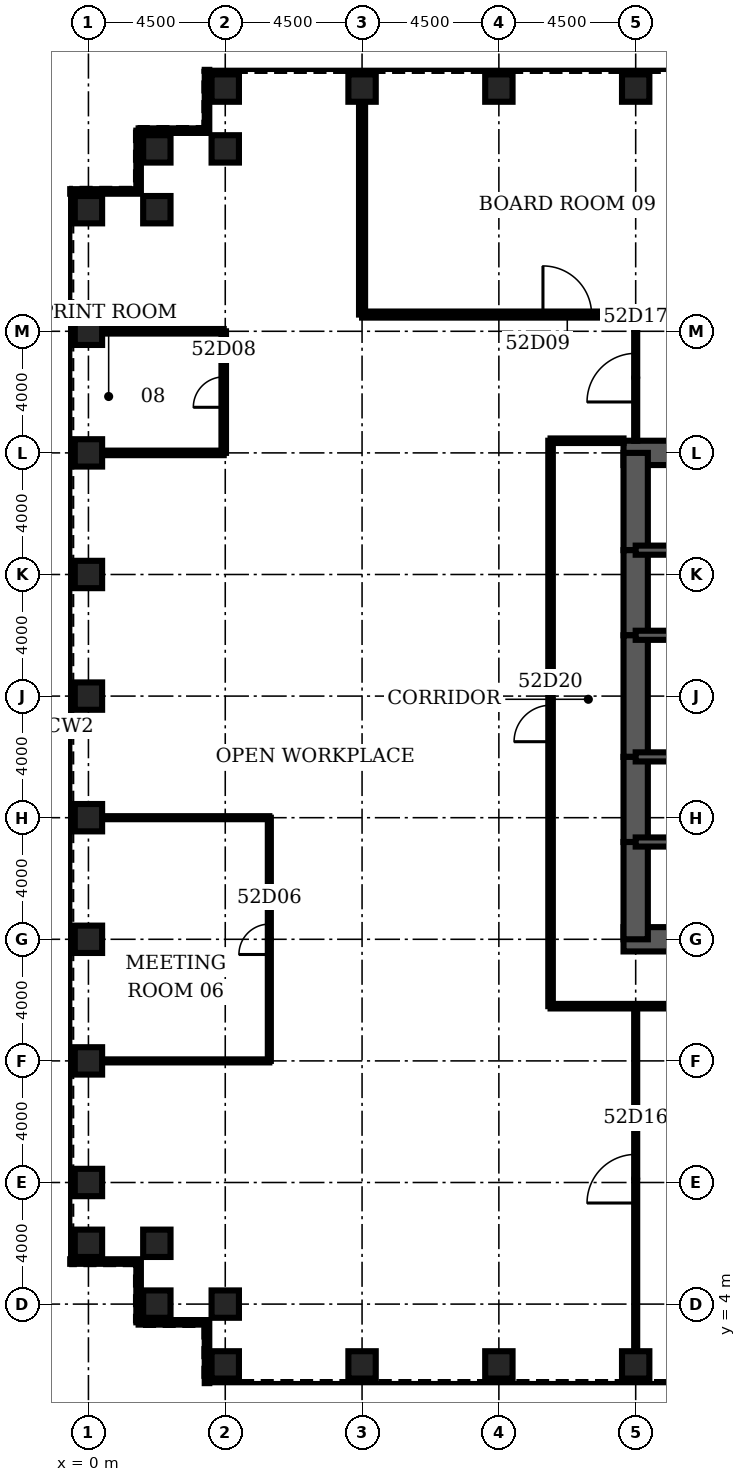
"""IFC4 building model, lengths in metres.
Left out: names, types, materials, properties, quantities, classifications, styles, units other than length and angle.
Written with IfcOpenShell. Run it as: python <this file> out.ifc"""

import sys

from ifc_helpers import new_model, si_unit, direction, frame, frame_2d, origin, origin_2d, place, context, subcontext, project, spatial, rectangle, hollow_rectangle, extrude, element, fill, save


model = new_model("IFC4")
c1 = context("Model", 3, precision=1e-05, world=origin(), true_north=direction((0.0, 1.0)))
c2 = subcontext(c1, "Body", "Model", "MODEL_VIEW")
j1 = project(units=[si_unit("LENGTHUNIT", "METRE"), si_unit("PLANEANGLEUNIT", "RADIAN")], contexts=[c1])
p1 = place(None, origin())
s1 = spatial("IfcSite", under=j1, at=p1, CompositionType="ELEMENT")
p2 = place(p1, origin())
s2 = spatial("IfcBuilding", under=s1, at=p2, CompositionType="ELEMENT")
p3 = place(p2, frame((0.0, 0.0, 232.0)))
s3 = spatial("IfcBuildingStorey", under=s2, at=p3, CompositionType="ELEMENT", Elevation=232.0)
for number, where, z_axis, x_axis in (
    (1, (4.5, 2.0, 0.0), (0.0, 0.0, 1.0), (0.0, 1.0, 0.0)),
    (2, (9.0, 2.0, 0.0), (0.0, 0.0, 1.0), (0.0, 1.0, 0.0)),
    (3, (13.5, 2.0, 0.0), (0.0, 0.0, 1.0), (0.0, 1.0, 0.0)),
    (4, (18.0, 2.0, 0.0), (0.0, 0.0, 1.0), (0.0, 1.0, 0.0)),
    (5, (18.0, 44.0, 0.0), (0.0, 0.0, 1.0), (0.0, 1.0, 0.0)),
    (6, (13.5, 44.0, 0.0), (0.0, 0.0, 1.0), (0.0, 1.0, 0.0)),
    (7, (9.0, 44.0, 0.0), (0.0, 0.0, 1.0), (0.0, 1.0, 0.0)),
    (8, (4.5, 44.0, 0.0), (0.0, 0.0, 1.0), (0.0, 1.0, 0.0)),
    (9, (4.5, 42.0, 0.0), (0.0, 0.0, 1.0), (0.0, 1.0, 0.0)),
    (10, (2.25, 42.0, 0.0), (0.0, 0.0, 1.0), (1.0, 0.0, 0.0)),
    (11, (2.25, 40.0, 0.0), (0.0, 0.0, 1.0), (1.0, 0.0, 0.0)),
    (12, (0.0, 40.0, 0.0), (0.0, 0.0, 1.0), (1.0, 0.0, 0.0)),
    (13, (0.0, 36.0, 0.0), (0.0, 0.0, 1.0), (1.0, 0.0, 0.0)),
    (14, (0.0, 32.0, 0.0), (0.0, 0.0, 1.0), (1.0, 0.0, 0.0)),
    (15, (0.0, 28.0, 0.0), (0.0, 0.0, 1.0), (1.0, 0.0, 0.0)),
    (16, (0.0, 24.0, 0.0), (0.0, 0.0, 1.0), (1.0, 0.0, 0.0)),
    (17, (0.0, 20.0, 0.0), (0.0, 0.0, 1.0), (1.0, 0.0, 0.0)),
    (18, (0.0, 16.0, 0.0), (0.0, 0.0, 1.0), (1.0, 0.0, 0.0)),
    (19, (0.0, 12.0, 0.0), (0.0, 0.0, 1.0), (1.0, 0.0, 0.0)),
    (20, (0.0, 8.0, 0.0), (0.0, 0.0, 1.0), (1.0, 0.0, 0.0)),
    (21, (0.0, 6.0, 0.0), (0.0, 0.0, 1.0), (1.0, 0.0, 0.0)),
    (22, (2.25, 6.0, 0.0), (0.0, 0.0, 1.0), (1.0, 0.0, 0.0)),
    (23, (2.25, 4.0, 0.0), (0.0, 0.0, 1.0), (1.0, 0.0, 0.0)),
    (24, (4.5, 4.0, 0.0), (0.0, 0.0, 1.0), (0.0, 1.0, 0.0)),
):
    element("IfcColumn", number, at=place(p3, frame(where, z_axis=z_axis, x_axis=x_axis)), inside=s3, PredefinedType="COLUMN", context=c2, shape_type="SweptSolid", body=[
        extrude(hollow_rectangle(XDim=0.9, YDim=0.9, WallThickness=0.08, at=origin_2d()), origin(), (0.0, 0.0, 1.0), 4.2),
    ])
for number, where, z_axis, x_axis in (
    (25, (17.6, 16.0, 0.0), (0.0, 0.0, 1.0), (1.0, 0.0, 0.0)),
    (26, (27.0, 32.0, 0.0), (0.0, 0.0, 1.0), (-1.0, 0.0, 0.0)),
):
    element("IfcWall", number, at=place(p3, frame(where, z_axis=z_axis, x_axis=x_axis)), inside=s3, PredefinedType="SHEAR", context=c2, shape_type="SweptSolid", body=[
        extrude(rectangle(XDim=9.4, YDim=0.8, at=frame_2d((4.7, 0.0))), origin(), (0.0, 0.0, 1.0), 4.2),
    ])
p4 = place(p3, frame((18.0, 32.0, 0.0), z_axis=(0.0, 0.0, 1.0), x_axis=(0.0, -1.0, 0.0)))
e27 = element("IfcWall", 27, at=p4, inside=s3, PredefinedType="SHEAR", context=c2, shape_type="SweptSolid", body=[
    extrude(rectangle(XDim=3.2, YDim=0.8, at=frame_2d((1.6, 0.0))), origin(), (0.0, 0.0, 1.0), 4.2),
])
p5 = place(p3, frame((18.0, 28.8, 0.0), z_axis=(0.0, 0.0, 1.0), x_axis=(0.0, -1.0, 0.0)))
e28 = element("IfcWall", 28, at=p5, inside=s3, PredefinedType="SHEAR", context=c2, shape_type="SweptSolid", body=[
    extrude(rectangle(XDim=2.8, YDim=0.8, at=frame_2d((1.4, 0.0))), origin(), (0.0, 0.0, 1.0), 4.2),
])
p6 = place(p5, frame((0.4, 0.0, 0.0)))
e29 = element("IfcOpeningElement", 29, at=p6, cuts=e28, PredefinedType="OPENING", context=c2, shape_type="SweptSolid", body=[
    extrude(rectangle(XDim=1.8, YDim=2.1, at=frame_2d((0.9, 1.05))), frame((0.0, 0.41, 0.0), z_axis=(0.0, -1.0, 0.0), x_axis=(1.0, 0.0, 0.0)), (0.0, 0.0, 1.0), 0.82),
])
p7 = place(p3, frame((18.0, 26.0, 0.0), z_axis=(0.0, 0.0, 1.0), x_axis=(0.0, -1.0, 0.0)))
e30 = element("IfcWall", 30, at=p7, inside=s3, PredefinedType="SHEAR", context=c2, shape_type="SweptSolid", body=[
    extrude(rectangle(XDim=4.0, YDim=0.8, at=frame_2d((2.0, 0.0))), origin(), (0.0, 0.0, 1.0), 4.2),
])
p8 = place(p3, frame((18.0, 22.0, 0.0), z_axis=(0.0, 0.0, 1.0), x_axis=(0.0, -1.0, 0.0)))
e31 = element("IfcWall", 31, at=p8, inside=s3, PredefinedType="SHEAR", context=c2, shape_type="SweptSolid", body=[
    extrude(rectangle(XDim=2.8, YDim=0.8, at=frame_2d((1.4, 0.0))), origin(), (0.0, 0.0, 1.0), 4.2),
])
p9 = place(p8, frame((0.6, 0.0, 0.0)))
e32 = element("IfcOpeningElement", 32, at=p9, cuts=e31, PredefinedType="OPENING", context=c2, shape_type="SweptSolid", body=[
    extrude(rectangle(XDim=1.8, YDim=2.1, at=frame_2d((0.9, 1.05))), frame((0.0, 0.41, 0.0), z_axis=(0.0, -1.0, 0.0), x_axis=(1.0, 0.0, 0.0)), (0.0, 0.0, 1.0), 0.82),
])
p10 = place(p3, frame((18.0, 19.2, 0.0), z_axis=(0.0, 0.0, 1.0), x_axis=(0.0, -1.0, 0.0)))
e33 = element("IfcWall", 33, at=p10, inside=s3, PredefinedType="SHEAR", context=c2, shape_type="SweptSolid", body=[
    extrude(rectangle(XDim=3.2, YDim=0.8, at=frame_2d((1.6, 0.0))), origin(), (0.0, 0.0, 1.0), 4.2),
])
p11 = place(p3, frame((18.0, 19.2, 0.0), z_axis=(0.0, 0.0, 1.0), x_axis=(1.0, 0.0, 0.0)))
e34 = element("IfcWall", 34, at=p11, inside=s3, PredefinedType="SOLIDWALL", context=c2, shape_type="SweptSolid", body=[
    extrude(rectangle(XDim=9.0, YDim=0.3, at=frame_2d((4.5, 0.0))), origin(), (0.0, 0.0, 1.0), 4.2),
])
p12 = place(p11, frame((0.65, 0.0, 0.0)))
e35 = element("IfcOpeningElement", 35, at=p12, cuts=e34, PredefinedType="OPENING", context=c2, shape_type="SweptSolid", body=[
    extrude(rectangle(XDim=1.0, YDim=2.1, at=frame_2d((0.5, 1.05))), frame((0.0, 0.16, 0.0), z_axis=(0.0, -1.0, 0.0), x_axis=(1.0, 0.0, 0.0)), (0.0, 0.0, 1.0), 0.32),
])
p13 = place(p3, frame((18.0, 28.8, 0.0), z_axis=(0.0, 0.0, 1.0), x_axis=(1.0, 0.0, 0.0)))
e36 = element("IfcWall", 36, at=p13, inside=s3, PredefinedType="SOLIDWALL", context=c2, shape_type="SweptSolid", body=[
    extrude(rectangle(XDim=9.0, YDim=0.3, at=frame_2d((4.5, 0.0))), origin(), (0.0, 0.0, 1.0), 4.2),
])
p14 = place(p13, frame((0.65, 0.0, 0.0)))
e37 = element("IfcOpeningElement", 37, at=p14, cuts=e36, PredefinedType="OPENING", context=c2, shape_type="SweptSolid", body=[
    extrude(rectangle(XDim=1.0, YDim=2.1, at=frame_2d((0.5, 1.05))), frame((0.0, 0.16, 0.0), z_axis=(0.0, -1.0, 0.0), x_axis=(1.0, 0.0, 0.0)), (0.0, 0.0, 1.0), 0.32),
])
p15 = place(p3, frame((18.0, 22.0, 0.0), z_axis=(0.0, 0.0, 1.0), x_axis=(1.0, 0.0, 0.0)))
e38 = element("IfcWall", 38, at=p15, inside=s3, PredefinedType="SOLIDWALL", context=c2, shape_type="SweptSolid", body=[
    extrude(rectangle(XDim=6.0, YDim=0.3, at=frame_2d((3.0, 0.0))), origin(), (0.0, 0.0, 1.0), 4.2),
])
p16 = place(p15, frame((4.4, 0.0, 0.0)))
e39 = element("IfcOpeningElement", 39, at=p16, cuts=e38, PredefinedType="OPENING", context=c2, shape_type="SweptSolid", body=[
    extrude(rectangle(XDim=1.0, YDim=2.1, at=frame_2d((0.5, 1.05))), frame((0.0, 0.16, 0.0), z_axis=(0.0, -1.0, 0.0), x_axis=(1.0, 0.0, 0.0)), (0.0, 0.0, 1.0), 0.32),
])
p17 = place(p15, frame((0.8, 0.0, 0.0)))
e40 = element("IfcOpeningElement", 40, at=p17, cuts=e38, PredefinedType="OPENING", context=c2, shape_type="SweptSolid", body=[
    extrude(rectangle(XDim=1.0, YDim=2.1, at=frame_2d((0.5, 1.05))), frame((0.0, 0.16, 0.0), z_axis=(0.0, -1.0, 0.0), x_axis=(1.0, 0.0, 0.0)), (0.0, 0.0, 1.0), 0.32),
])
p18 = place(p3, frame((18.0, 26.0, 0.0), z_axis=(0.0, 0.0, 1.0), x_axis=(1.0, 0.0, 0.0)))
e41 = element("IfcWall", 41, at=p18, inside=s3, PredefinedType="SOLIDWALL", context=c2, shape_type="SweptSolid", body=[
    extrude(rectangle(XDim=6.0, YDim=0.3, at=frame_2d((3.0, 0.0))), origin(), (0.0, 0.0, 1.0), 4.2),
])
p19 = place(p3, frame((0.45, 12.0, 0.0), z_axis=(0.0, 0.0, 1.0), x_axis=(1.0, 0.0, 0.0)))
e42 = element("IfcWall", 42, at=p19, inside=s3, PredefinedType="PARTITIONING", context=c2, shape_type="SweptSolid", body=[
    extrude(rectangle(XDim=5.5, YDim=0.1, at=frame_2d((2.75, 0.0))), origin(), (0.0, 0.0, 1.0), 3.0),
])
p20 = place(p3, frame((15.2, 13.8, 0.0), z_axis=(0.0, 0.0, 1.0), x_axis=(1.0, 0.0, 0.0)))
e43 = element("IfcWall", 43, at=p20, inside=s3, PredefinedType="PARTITIONING", context=c2, shape_type="SweptSolid", body=[
    extrude(rectangle(XDim=6.8, YDim=0.15, at=frame_2d((3.4, 0.0))), origin(), (0.0, 0.0, 1.0), 3.0),
])
p21 = place(p3, frame((0.45, 20.0, 0.0), z_axis=(0.0, 0.0, 1.0), x_axis=(1.0, 0.0, 0.0)))
e44 = element("IfcWall", 44, at=p21, inside=s3, PredefinedType="PARTITIONING", context=c2, shape_type="SweptSolid", body=[
    extrude(rectangle(XDim=5.5, YDim=0.1, at=frame_2d((2.75, 0.0))), origin(), (0.0, 0.0, 1.0), 3.0),
])
p22 = place(p3, frame((0.45, 32.0, 0.0), z_axis=(0.0, 0.0, 1.0), x_axis=(1.0, 0.0, 0.0)))
e45 = element("IfcWall", 45, at=p22, inside=s3, PredefinedType="PARTITIONING", context=c2, shape_type="SweptSolid", body=[
    extrude(rectangle(XDim=4.0, YDim=0.15, at=frame_2d((2.0, 0.0))), origin(), (0.0, 0.0, 1.0), 3.0),
])
p23 = place(p3, frame((15.2, 32.4, 0.0), z_axis=(0.0, 0.0, 1.0), x_axis=(1.0, 0.0, 0.0)))
e46 = element("IfcWall", 46, at=p23, inside=s3, PredefinedType="PARTITIONING", context=c2, shape_type="SweptSolid", body=[
    extrude(rectangle(XDim=2.4, YDim=0.15, at=frame_2d((1.2, 0.0))), origin(), (0.0, 0.0, 1.0), 3.0),
])
p24 = place(p3, frame((0.45, 36.0, 0.0), z_axis=(0.0, 0.0, 1.0), x_axis=(1.0, 0.0, 0.0)))
e47 = element("IfcWall", 47, at=p24, inside=s3, PredefinedType="PARTITIONING", context=c2, shape_type="SweptSolid", body=[
    extrude(rectangle(XDim=4.0, YDim=0.15, at=frame_2d((2.0, 0.0))), origin(), (0.0, 0.0, 1.0), 3.0),
])
p25 = place(p3, frame((9.0, 36.55, 0.0), z_axis=(0.0, 0.0, 1.0), x_axis=(1.0, 0.0, 0.0)))
e48 = element("IfcWall", 48, at=p25, inside=s3, PredefinedType="PARTITIONING", context=c2, shape_type="SweptSolid", body=[
    extrude(rectangle(XDim=13.5, YDim=0.2, at=frame_2d((6.75, 0.0))), origin(), (0.0, 0.0, 1.0), 3.0),
])
p26 = place(p25, frame((5.95, 0.0, 0.0)))
e49 = element("IfcOpeningElement", 49, at=p26, cuts=e48, PredefinedType="OPENING", context=c2, shape_type="SweptSolid", body=[
    extrude(rectangle(XDim=1.6, YDim=2.1, at=frame_2d((0.8, 1.05))), frame((0.0, 0.11, 0.0), z_axis=(0.0, -1.0, 0.0), x_axis=(1.0, 0.0, 0.0)), (0.0, 0.0, 1.0), 0.22),
])
p27 = place(p3, frame((4.45, 32.0, 0.0), z_axis=(0.0, 0.0, 1.0), x_axis=(0.0, 1.0, 0.0)))
e50 = element("IfcWall", 50, at=p27, inside=s3, PredefinedType="PARTITIONING", context=c2, shape_type="SweptSolid", body=[
    extrude(rectangle(XDim=4.0, YDim=0.15, at=frame_2d((2.0, 0.0))), origin(), (0.0, 0.0, 1.0), 3.0),
])
p28 = place(p27, frame((1.5, 0.0, 0.0)))
e51 = element("IfcOpeningElement", 51, at=p28, cuts=e50, PredefinedType="OPENING", context=c2, shape_type="SweptSolid", body=[
    extrude(rectangle(XDim=1.0, YDim=2.1, at=frame_2d((0.5, 1.05))), frame((0.0, 0.085, 0.0), z_axis=(0.0, -1.0, 0.0), x_axis=(1.0, 0.0, 0.0)), (0.0, 0.0, 1.0), 0.17),
])
p29 = place(p3, frame((5.95, 12.0, 0.0), z_axis=(0.0, 0.0, 1.0), x_axis=(0.0, 1.0, 0.0)))
e52 = element("IfcWall", 52, at=p29, inside=s3, PredefinedType="PARTITIONING", context=c2, shape_type="SweptSolid", body=[
    extrude(rectangle(XDim=8.0, YDim=0.1, at=frame_2d((4.0, 0.0))), origin(), (0.0, 0.0, 1.0), 3.0),
])
p30 = place(p29, frame((3.5, 0.0, 0.0)))
e53 = element("IfcOpeningElement", 53, at=p30, cuts=e52, PredefinedType="OPENING", context=c2, shape_type="SweptSolid", body=[
    extrude(rectangle(XDim=1.0, YDim=2.1, at=frame_2d((0.5, 1.05))), frame((0.0, 0.06, 0.0), z_axis=(0.0, -1.0, 0.0), x_axis=(1.0, 0.0, 0.0)), (0.0, 0.0, 1.0), 0.12),
])
p31 = place(p3, frame((9.0, 36.55, 0.0), z_axis=(0.0, 0.0, 1.0), x_axis=(0.0, 1.0, 0.0)))
e54 = element("IfcWall", 54, at=p31, inside=s3, PredefinedType="PARTITIONING", context=c2, shape_type="SweptSolid", body=[
    extrude(rectangle(XDim=7.0, YDim=0.2, at=frame_2d((3.5, 0.0))), origin(), (0.0, 0.0, 1.0), 3.0),
])
p32 = place(p3, frame((15.2, 13.8, 0.0), z_axis=(0.0, 0.0, 1.0), x_axis=(0.0, 1.0, 0.0)))
e55 = element("IfcWall", 55, at=p32, inside=s3, PredefinedType="PARTITIONING", context=c2, shape_type="SweptSolid", body=[
    extrude(rectangle(XDim=18.6, YDim=0.15, at=frame_2d((9.3, 0.0))), origin(), (0.0, 0.0, 1.0), 3.0),
])
p33 = place(p32, frame((8.7, 0.0, 0.0)))
e56 = element("IfcOpeningElement", 56, at=p33, cuts=e55, PredefinedType="OPENING", context=c2, shape_type="SweptSolid", body=[
    extrude(rectangle(XDim=1.2, YDim=2.1, at=frame_2d((0.6, 1.05))), frame((0.0, 0.085, 0.0), z_axis=(0.0, -1.0, 0.0), x_axis=(1.0, 0.0, 0.0)), (0.0, 0.0, 1.0), 0.17),
])
p34 = place(p3, frame((18.0, 2.45, 0.0), z_axis=(0.0, 0.0, 1.0), x_axis=(0.0, 1.0, 0.0)))
e57 = element("IfcWall", 57, at=p34, inside=s3, PredefinedType="PARTITIONING", context=c2, shape_type="SweptSolid", body=[
    extrude(rectangle(XDim=11.35, YDim=0.1, at=frame_2d((5.675, 0.0))), origin(), (0.0, 0.0, 1.0), 3.0),
])
p35 = place(p34, frame((4.875, 0.0, 0.0)))
e58 = element("IfcOpeningElement", 58, at=p35, cuts=e57, PredefinedType="OPENING", context=c2, shape_type="SweptSolid", body=[
    extrude(rectangle(XDim=1.6, YDim=2.1, at=frame_2d((0.8, 1.05))), frame((0.0, 0.06, 0.0), z_axis=(0.0, -1.0, 0.0), x_axis=(1.0, 0.0, 0.0)), (0.0, 0.0, 1.0), 0.12),
])
p36 = place(p3, frame((18.0, 32.4, 0.0), z_axis=(0.0, 0.0, 1.0), x_axis=(0.0, 1.0, 0.0)))
e59 = element("IfcWall", 59, at=p36, inside=s3, PredefinedType="PARTITIONING", context=c2, shape_type="SweptSolid", body=[
    extrude(rectangle(XDim=4.15, YDim=0.1, at=frame_2d((2.075, 0.0))), origin(), (0.0, 0.0, 1.0), 3.0),
])
p37 = place(p36, frame((1.275, 0.0, 0.0)))
e60 = element("IfcOpeningElement", 60, at=p37, cuts=e59, PredefinedType="OPENING", context=c2, shape_type="SweptSolid", body=[
    extrude(rectangle(XDim=1.6, YDim=2.1, at=frame_2d((0.8, 1.05))), frame((0.0, 0.06, 0.0), z_axis=(0.0, -1.0, 0.0), x_axis=(1.0, 0.0, 0.0)), (0.0, 0.0, 1.0), 0.12),
])
p38 = place(p3, frame((3.9, 44.6, 0.0), z_axis=(0.0, 0.0, 1.0), x_axis=(0.0, -1.0, 0.0)))
e61 = element("IfcWall", 61, at=p38, inside=s3, PredefinedType="ELEMENTEDWALL", context=c2, shape_type="SweptSolid", body=[
    extrude(rectangle(XDim=2.0, YDim=0.15, at=frame_2d((1.0, 0.0))), origin(), (0.0, 0.0, 1.0), 4.04),
])
p39 = place(p3, frame((3.9, 42.6, 0.0), z_axis=(0.0, 0.0, 1.0), x_axis=(-1.0, 0.0, 0.0)))
e62 = element("IfcWall", 62, at=p39, inside=s3, PredefinedType="ELEMENTEDWALL", context=c2, shape_type="SweptSolid", body=[
    extrude(rectangle(XDim=2.25, YDim=0.15, at=frame_2d((1.125, 0.0))), origin(), (0.0, 0.0, 1.0), 4.04),
])
p40 = place(p3, frame((1.65, 42.6, 0.0), z_axis=(0.0, 0.0, 1.0), x_axis=(0.0, -1.0, 0.0)))
e63 = element("IfcWall", 63, at=p40, inside=s3, PredefinedType="ELEMENTEDWALL", context=c2, shape_type="SweptSolid", body=[
    extrude(rectangle(XDim=2.0, YDim=0.15, at=frame_2d((1.0, 0.0))), origin(), (0.0, 0.0, 1.0), 4.04),
])
for number, where, z_axis, x_axis in (
    (64, (1.65, 40.6, 0.0), (0.0, 0.0, 1.0), (-1.0, 0.0, 0.0)),
    (65, (-0.6, 5.4, 0.0), (0.0, 0.0, 1.0), (1.0, 0.0, 0.0)),
):
    element("IfcWall", number, at=place(p3, frame(where, z_axis=z_axis, x_axis=x_axis)), inside=s3, PredefinedType="ELEMENTEDWALL", context=c2, shape_type="SweptSolid", body=[
        extrude(rectangle(XDim=2.25, YDim=0.15, at=frame_2d((1.125, 0.0))), origin(), (0.0, 0.0, 1.0), 4.04),
    ])
p41 = place(p3, frame((1.65, 5.4, 0.0), z_axis=(0.0, 0.0, 1.0), x_axis=(0.0, -1.0, 0.0)))
e66 = element("IfcWall", 66, at=p41, inside=s3, PredefinedType="ELEMENTEDWALL", context=c2, shape_type="SweptSolid", body=[
    extrude(rectangle(XDim=2.0, YDim=0.15, at=frame_2d((1.0, 0.0))), origin(), (0.0, 0.0, 1.0), 4.04),
])
p42 = place(p3, frame((1.65, 3.4, 0.0), z_axis=(0.0, 0.0, 1.0), x_axis=(1.0, 0.0, 0.0)))
e67 = element("IfcWall", 67, at=p42, inside=s3, PredefinedType="ELEMENTEDWALL", context=c2, shape_type="SweptSolid", body=[
    extrude(rectangle(XDim=2.25, YDim=0.15, at=frame_2d((1.125, 0.0))), origin(), (0.0, 0.0, 1.0), 4.04),
])
p43 = place(p3, frame((3.9, 3.4, 0.0), z_axis=(0.0, 0.0, 1.0), x_axis=(0.0, -1.0, 0.0)))
e68 = element("IfcWall", 68, at=p43, inside=s3, PredefinedType="ELEMENTEDWALL", context=c2, shape_type="SweptSolid", body=[
    extrude(rectangle(XDim=2.0, YDim=0.15, at=frame_2d((1.0, 0.0))), origin(), (0.0, 0.0, 1.0), 4.04),
])
p44 = place(p30, origin())
e69 = element("IfcDoor", 69, at=p44, inside=s3, OperationType="SINGLE_SWING_LEFT", PredefinedType="DOOR", context=c2, shape_type="SweptSolid", body=[
    extrude(rectangle(XDim=1.0, YDim=2.1, at=frame_2d((0.5, 1.05))), frame((0.0, 0.025, 0.0), z_axis=(0.0, -1.0, 0.0), x_axis=(1.0, 0.0, 0.0)), (0.0, 0.0, 1.0), 0.05),
])
fill(e53, e69)
p45 = place(p28, origin())
e70 = element("IfcDoor", 70, at=p45, inside=s3, OperationType="SINGLE_SWING_LEFT", PredefinedType="DOOR", context=c2, shape_type="SweptSolid", body=[
    extrude(rectangle(XDim=1.0, YDim=2.1, at=frame_2d((0.5, 1.05))), frame((0.0, 0.025, 0.0), z_axis=(0.0, -1.0, 0.0), x_axis=(1.0, 0.0, 0.0)), (0.0, 0.0, 1.0), 0.05),
])
fill(e51, e70)
p46 = place(p26, origin())
e71 = element("IfcDoor", 71, at=p46, inside=s3, OperationType="SINGLE_SWING_LEFT", PredefinedType="DOOR", context=c2, shape_type="SweptSolid", body=[
    extrude(rectangle(XDim=1.6, YDim=2.1, at=frame_2d((0.8, 1.05))), frame((0.0, 0.025, 0.0), z_axis=(0.0, -1.0, 0.0), x_axis=(1.0, 0.0, 0.0)), (0.0, 0.0, 1.0), 0.05),
])
fill(e49, e71)
p47 = place(p35, origin())
e72 = element("IfcDoor", 72, at=p47, inside=s3, OperationType="SINGLE_SWING_LEFT", PredefinedType="DOOR", context=c2, shape_type="SweptSolid", body=[
    extrude(rectangle(XDim=1.6, YDim=2.1, at=frame_2d((0.8, 1.05))), frame((0.0, 0.025, 0.0), z_axis=(0.0, -1.0, 0.0), x_axis=(1.0, 0.0, 0.0)), (0.0, 0.0, 1.0), 0.05),
])
fill(e58, e72)
p48 = place(p37, origin())
e73 = element("IfcDoor", 73, at=p48, inside=s3, OperationType="SINGLE_SWING_LEFT", PredefinedType="DOOR", context=c2, shape_type="SweptSolid", body=[
    extrude(rectangle(XDim=1.6, YDim=2.1, at=frame_2d((0.8, 1.05))), frame((0.0, 0.025, 0.0), z_axis=(0.0, -1.0, 0.0), x_axis=(1.0, 0.0, 0.0)), (0.0, 0.0, 1.0), 0.05),
])
fill(e60, e73)
p49 = place(p33, origin())
e74 = element("IfcDoor", 74, at=p49, inside=s3, OperationType="SINGLE_SWING_LEFT", PredefinedType="DOOR", context=c2, shape_type="SweptSolid", body=[
    extrude(rectangle(XDim=1.2, YDim=2.1, at=frame_2d((0.6, 1.05))), frame((0.0, 0.025, 0.0), z_axis=(0.0, -1.0, 0.0), x_axis=(1.0, 0.0, 0.0)), (0.0, 0.0, 1.0), 0.05),
])
fill(e56, e74)
p50 = place(p12, origin())
e75 = element("IfcDoor", 75, at=p50, inside=s3, OperationType="SINGLE_SWING_LEFT", PredefinedType="DOOR", context=c2, shape_type="SweptSolid", body=[
    extrude(rectangle(XDim=1.0, YDim=2.1, at=frame_2d((0.5, 1.05))), frame((0.0, 0.025, 0.0), z_axis=(0.0, -1.0, 0.0), x_axis=(1.0, 0.0, 0.0)), (0.0, 0.0, 1.0), 0.05),
])
fill(e35, e75)
p51 = place(p14, origin())
e76 = element("IfcDoor", 76, at=p51, inside=s3, OperationType="SINGLE_SWING_LEFT", PredefinedType="DOOR", context=c2, shape_type="SweptSolid", body=[
    extrude(rectangle(XDim=1.0, YDim=2.1, at=frame_2d((0.5, 1.05))), frame((0.0, 0.025, 0.0), z_axis=(0.0, -1.0, 0.0), x_axis=(1.0, 0.0, 0.0)), (0.0, 0.0, 1.0), 0.05),
])
fill(e37, e76)
p52 = place(p9, origin())
e77 = element("IfcDoor", 77, at=p52, inside=s3, OperationType="SINGLE_SWING_LEFT", PredefinedType="DOOR", context=c2, shape_type="SweptSolid", body=[
    extrude(rectangle(XDim=1.8, YDim=2.1, at=frame_2d((0.9, 1.05))), frame((0.0, 0.4, 0.0), z_axis=(0.0, -1.0, 0.0), x_axis=(1.0, 0.0, 0.0)), (0.0, 0.0, 1.0), 0.8),
])
fill(e32, e77)
p53 = place(p6, origin())
e78 = element("IfcDoor", 78, at=p53, inside=s3, OperationType="SINGLE_SWING_LEFT", PredefinedType="DOOR", context=c2, shape_type="SweptSolid", body=[
    extrude(rectangle(XDim=1.8, YDim=2.1, at=frame_2d((0.9, 1.05))), frame((0.0, 0.4, 0.0), z_axis=(0.0, -1.0, 0.0), x_axis=(1.0, 0.0, 0.0)), (0.0, 0.0, 1.0), 0.8),
])
fill(e29, e78)
p54 = place(p17, origin())
e79 = element("IfcDoor", 79, at=p54, inside=s3, OperationType="SINGLE_SWING_LEFT", PredefinedType="DOOR", context=c2, shape_type="SweptSolid", body=[
    extrude(rectangle(XDim=1.0, YDim=2.1, at=frame_2d((0.5, 1.05))), frame((0.0, 0.025, 0.0), z_axis=(0.0, -1.0, 0.0), x_axis=(1.0, 0.0, 0.0)), (0.0, 0.0, 1.0), 0.05),
])
fill(e40, e79)
save(model, sys.argv[1])
